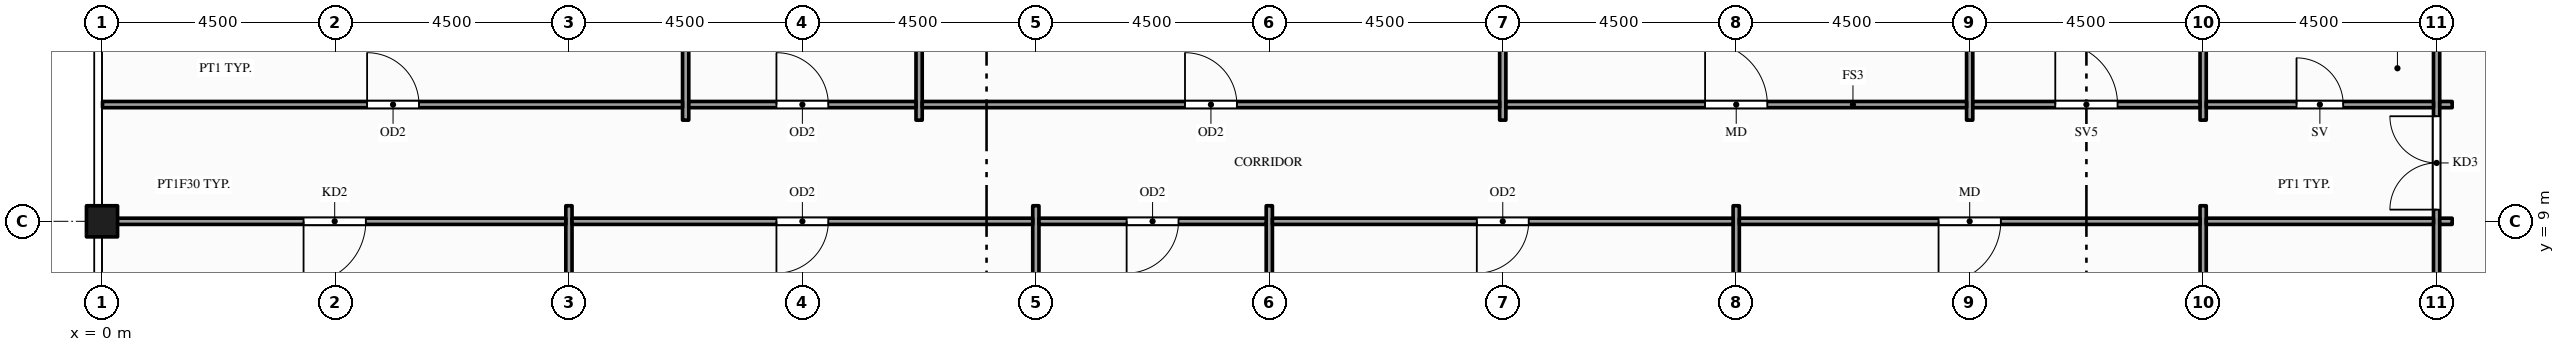
"""IFC4 building model, lengths in metres.
Left out: names, types, materials, properties, quantities, classifications, styles, units other than length and angle.
Written with IfcOpenShell. Run it as: python <this file> out.ifc"""

import sys

from ifc_helpers import new_model, si_unit, direction, frame, frame_2d, origin, origin_2d, place, context, subcontext, project, spatial, rectangle, hollow_rectangle, extrude, element, fill, save


model = new_model("IFC4")
c1 = context("Model", 3, precision=1e-05, world=origin(), true_north=direction((0.0, 1.0)))
c2 = subcontext(c1, "Body", "Model", "MODEL_VIEW")
j1 = project(units=[si_unit("LENGTHUNIT", "METRE"), si_unit("PLANEANGLEUNIT", "RADIAN")], contexts=[c1])
p1 = place(None, origin())
s1 = spatial("IfcSite", under=j1, at=p1, CompositionType="ELEMENT")
p2 = place(p1, origin())
s2 = spatial("IfcBuilding", under=s1, at=p2, CompositionType="ELEMENT")
p3 = place(p2, frame((0.0, 0.0, 314.0)))
s3 = spatial("IfcBuildingStorey", under=s2, at=p3, CompositionType="ELEMENT", Elevation=314.0)
p4 = place(p3, frame((0.0, 9.0, -0.15), z_axis=(0.0, 0.0, 1.0), x_axis=(1.0, 0.0, 0.0)))
e1 = element("IfcColumn", 1, at=p4, inside=s3, PredefinedType="COLUMN", context=c2, shape_type="SweptSolid", body=[
    extrude(hollow_rectangle(XDim=0.6, YDim=0.6, WallThickness=0.03, at=origin_2d()), origin(), (0.0, 0.0, 1.0), 4.5),
])
p5 = place(p3, frame((9.0, 3.875, 0.0), z_axis=(0.0, 0.0, 1.0), x_axis=(0.0, 1.0, 0.0)))
e2 = element("IfcWall", 2, at=p5, inside=s3, PredefinedType="PARTITIONING", context=c2, shape_type="SweptSolid", body=[
    extrude(rectangle(XDim=5.425, YDim=0.12, at=frame_2d((2.712, 0.0))), origin(), (0.0, 0.0, 1.0), 3.359),
])
for number, where, z_axis, x_axis in (
    (3, (11.25, 10.95, 0.0), (0.0, 0.0, 1.0), (0.0, 1.0, 0.0)),
    (4, (15.75, 10.95, 0.0), (0.0, 0.0, 1.0), (0.0, 1.0, 0.0)),
):
    element("IfcWall", number, at=place(p3, frame(where, z_axis=z_axis, x_axis=x_axis)), inside=s3, PredefinedType="PARTITIONING", context=c2, shape_type="SweptSolid", body=[
        extrude(rectangle(XDim=11.54, YDim=0.12, at=frame_2d((5.77, 0.0))), origin(), (0.0, 0.0, 1.0), 3.359),
    ])
for number, where, z_axis, x_axis in (
    (5, (18.0, 0.01, 0.0), (0.0, 0.0, 1.0), (0.0, 1.0, 0.0)),
    (6, (22.5, 0.01, 0.0), (0.0, 0.0, 1.0), (0.0, 1.0, 0.0)),
):
    element("IfcWall", number, at=place(p3, frame(where, z_axis=z_axis, x_axis=x_axis)), inside=s3, PredefinedType="PARTITIONING", context=c2, shape_type="SweptSolid", body=[
        extrude(rectangle(XDim=9.29, YDim=0.12, at=frame_2d((4.645, 0.0))), origin(), (0.0, 0.0, 1.0), 3.359),
    ])
p6 = place(p3, frame((27.0, 10.95, 0.0), z_axis=(0.0, 0.0, 1.0), x_axis=(0.0, 1.0, 0.0)))
e7 = element("IfcWall", 7, at=p6, inside=s3, PredefinedType="PARTITIONING", context=c2, shape_type="SweptSolid", body=[
    extrude(rectangle(XDim=11.54, YDim=0.12, at=frame_2d((5.77, 0.0))), origin(), (0.0, 0.0, 1.0), 3.359),
])
p7 = place(p3, frame((31.5, 0.01, 0.0), z_axis=(0.0, 0.0, 1.0), x_axis=(0.0, 1.0, 0.0)))
e8 = element("IfcWall", 8, at=p7, inside=s3, PredefinedType="PARTITIONING", context=c2, shape_type="SweptSolid", body=[
    extrude(rectangle(XDim=9.29, YDim=0.12, at=frame_2d((4.645, 0.0))), origin(), (0.0, 0.0, 1.0), 3.359),
])
p8 = place(p3, frame((36.0, 10.95, 0.0), z_axis=(0.0, 0.0, 1.0), x_axis=(0.0, 1.0, 0.0)))
e9 = element("IfcWall", 9, at=p8, inside=s3, PredefinedType="PARTITIONING", context=c2, shape_type="SweptSolid", body=[
    extrude(rectangle(XDim=11.54, YDim=0.12, at=frame_2d((5.77, 0.0))), origin(), (0.0, 0.0, 1.0), 3.359),
])
p9 = place(p3, frame((40.5, 0.01, 0.0), z_axis=(0.0, 0.0, 1.0), x_axis=(0.0, 1.0, 0.0)))
e10 = element("IfcWall", 10, at=p9, inside=s3, PredefinedType="PARTITIONING", context=c2, shape_type="SweptSolid", body=[
    extrude(rectangle(XDim=9.29, YDim=0.12, at=frame_2d((4.645, 0.0))), origin(), (0.0, 0.0, 1.0), 3.359),
])
p10 = place(p3, frame((40.5, 10.95, 0.0), z_axis=(0.0, 0.0, 1.0), x_axis=(0.0, 1.0, 0.0)))
e11 = element("IfcWall", 11, at=p10, inside=s3, PredefinedType="PARTITIONING", context=c2, shape_type="SweptSolid", body=[
    extrude(rectangle(XDim=11.54, YDim=0.12, at=frame_2d((5.77, 0.0))), origin(), (0.0, 0.0, 1.0), 3.359),
])
p11 = place(p3, frame((45.0, 0.01, 0.0), z_axis=(0.0, 0.0, 1.0), x_axis=(0.0, 1.0, 0.0)))
e12 = element("IfcWall", 12, at=p11, inside=s3, PredefinedType="PARTITIONING", context=c2, shape_type="SweptSolid", body=[
    extrude(rectangle(XDim=22.48, YDim=0.12, at=frame_2d((11.24, 0.0))), origin(), (0.0, 0.0, 1.0), 3.359),
])
p12 = place(p11, frame((9.215, 0.0, 0.0)))
e13 = element("IfcOpeningElement", 13, at=p12, cuts=e12, PredefinedType="OPENING", context=c2, shape_type="SweptSolid", body=[
    extrude(rectangle(XDim=1.8, YDim=2.1, at=frame_2d((0.9, 1.05))), frame((0.0, 0.07, 0.0), z_axis=(0.0, -1.0, 0.0), x_axis=(1.0, 0.0, 0.0)), (0.0, 0.0, 1.0), 0.14),
])
p13 = place(p11, frame((0.99, 0.0, 0.0)))
e14 = element("IfcOpeningElement", 14, at=p13, cuts=e12, PredefinedType="OPENING", context=c2, shape_type="SweptSolid", body=[
    extrude(rectangle(XDim=0.9, YDim=2.1, at=frame_2d((0.45, 1.05))), frame((0.0, 0.07, 0.0), z_axis=(0.0, -1.0, 0.0), x_axis=(1.0, 0.0, 0.0)), (0.0, 0.0, 1.0), 0.14),
])
p14 = place(p11, frame((4.04, 0.0, 0.0)))
e15 = element("IfcOpeningElement", 15, at=p14, cuts=e12, PredefinedType="OPENING", context=c2, shape_type="SweptSolid", body=[
    extrude(rectangle(XDim=0.9, YDim=2.1, at=frame_2d((0.45, 1.05))), frame((0.0, 0.07, 0.0), z_axis=(0.0, -1.0, 0.0), x_axis=(1.0, 0.0, 0.0)), (0.0, 0.0, 1.0), 0.14),
])
p15 = place(p11, frame((6.99, 0.0, 0.0)))
e16 = element("IfcOpeningElement", 16, at=p15, cuts=e12, PredefinedType="OPENING", context=c2, shape_type="SweptSolid", body=[
    extrude(rectangle(XDim=1.0, YDim=2.1, at=frame_2d((0.5, 1.05))), frame((0.0, 0.07, 0.0), z_axis=(0.0, -1.0, 0.0), x_axis=(1.0, 0.0, 0.0)), (0.0, 0.0, 1.0), 0.14),
])
p16 = place(p3, frame((0.01, 9.0, 0.0), z_axis=(0.0, 0.0, 1.0), x_axis=(1.0, 0.0, 0.0)))
e17 = element("IfcWall", 17, at=p16, inside=s3, PredefinedType="PARTITIONING", context=c2, shape_type="SweptSolid", body=[
    extrude(rectangle(XDim=8.93, YDim=0.12, at=frame_2d((4.465, 0.0))), origin(), (0.0, 0.0, 1.0), 3.359),
])
p17 = place(p16, frame((3.875, 0.0, 0.0)))
e18 = element("IfcOpeningElement", 18, at=p17, cuts=e17, PredefinedType="OPENING", context=c2, shape_type="SweptSolid", body=[
    extrude(rectangle(XDim=1.2, YDim=2.1, at=frame_2d((0.6, 1.05))), frame((0.0, 0.07, 0.0), z_axis=(0.0, -1.0, 0.0), x_axis=(1.0, 0.0, 0.0)), (0.0, 0.0, 1.0), 0.14),
])
p18 = place(p3, frame((9.06, 9.0, 0.0), z_axis=(0.0, 0.0, 1.0), x_axis=(1.0, 0.0, 0.0)))
e19 = element("IfcWall", 19, at=p18, inside=s3, PredefinedType="PARTITIONING", context=c2, shape_type="SweptSolid", body=[
    extrude(rectangle(XDim=8.88, YDim=0.12, at=frame_2d((4.44, 0.0))), origin(), (0.0, 0.0, 1.0), 3.359),
])
p19 = place(p18, frame((3.94, 0.0, 0.0)))
e20 = element("IfcOpeningElement", 20, at=p19, cuts=e19, PredefinedType="OPENING", context=c2, shape_type="SweptSolid", body=[
    extrude(rectangle(XDim=1.0, YDim=2.1, at=frame_2d((0.5, 1.05))), frame((0.0, 0.07, 0.0), z_axis=(0.0, -1.0, 0.0), x_axis=(1.0, 0.0, 0.0)), (0.0, 0.0, 1.0), 0.14),
])
p20 = place(p3, frame((18.06, 9.0, 0.0), z_axis=(0.0, 0.0, 1.0), x_axis=(1.0, 0.0, 0.0)))
e21 = element("IfcWall", 21, at=p20, inside=s3, PredefinedType="PARTITIONING", context=c2, shape_type="SweptSolid", body=[
    extrude(rectangle(XDim=4.38, YDim=0.12, at=frame_2d((2.19, 0.0))), origin(), (0.0, 0.0, 1.0), 3.359),
])
p21 = place(p20, frame((1.69, 0.0, 0.0)))
e22 = element("IfcOpeningElement", 22, at=p21, cuts=e21, PredefinedType="OPENING", context=c2, shape_type="SweptSolid", body=[
    extrude(rectangle(XDim=1.0, YDim=2.1, at=frame_2d((0.5, 1.05))), frame((0.0, 0.07, 0.0), z_axis=(0.0, -1.0, 0.0), x_axis=(1.0, 0.0, 0.0)), (0.0, 0.0, 1.0), 0.14),
])
p22 = place(p3, frame((22.56, 9.0, 0.0), z_axis=(0.0, 0.0, 1.0), x_axis=(1.0, 0.0, 0.0)))
e23 = element("IfcWall", 23, at=p22, inside=s3, PredefinedType="PARTITIONING", context=c2, shape_type="SweptSolid", body=[
    extrude(rectangle(XDim=8.88, YDim=0.12, at=frame_2d((4.44, 0.0))), origin(), (0.0, 0.0, 1.0), 3.359),
])
p23 = place(p22, frame((3.94, 0.0, 0.0)))
e24 = element("IfcOpeningElement", 24, at=p23, cuts=e23, PredefinedType="OPENING", context=c2, shape_type="SweptSolid", body=[
    extrude(rectangle(XDim=1.0, YDim=2.1, at=frame_2d((0.5, 1.05))), frame((0.0, 0.07, 0.0), z_axis=(0.0, -1.0, 0.0), x_axis=(1.0, 0.0, 0.0)), (0.0, 0.0, 1.0), 0.14),
])
p24 = place(p3, frame((31.56, 9.0, 0.0), z_axis=(0.0, 0.0, 1.0), x_axis=(1.0, 0.0, 0.0)))
e25 = element("IfcWall", 25, at=p24, inside=s3, PredefinedType="PARTITIONING", context=c2, shape_type="SweptSolid", body=[
    extrude(rectangle(XDim=8.88, YDim=0.12, at=frame_2d((4.44, 0.0))), origin(), (0.0, 0.0, 1.0), 3.359),
])
p25 = place(p24, frame((3.84, 0.0, 0.0)))
e26 = element("IfcOpeningElement", 26, at=p25, cuts=e25, PredefinedType="OPENING", context=c2, shape_type="SweptSolid", body=[
    extrude(rectangle(XDim=1.2, YDim=2.1, at=frame_2d((0.6, 1.05))), frame((0.0, 0.07, 0.0), z_axis=(0.0, -1.0, 0.0), x_axis=(1.0, 0.0, 0.0)), (0.0, 0.0, 1.0), 0.14),
])
p26 = place(p3, frame((40.56, 9.0, 0.0), z_axis=(0.0, 0.0, 1.0), x_axis=(1.0, 0.0, 0.0)))
e27 = element("IfcWall", 27, at=p26, inside=s3, PredefinedType="PARTITIONING", context=c2, shape_type="SweptSolid", body=[
    extrude(rectangle(XDim=4.38, YDim=0.12, at=frame_2d((2.19, 0.0))), origin(), (0.0, 0.0, 1.0), 3.359),
])
p27 = place(p3, frame((45.06, 9.0, 0.0), z_axis=(0.0, 0.0, 1.0), x_axis=(1.0, 0.0, 0.0)))
e28 = element("IfcWall", 28, at=p27, inside=s3, PredefinedType="PARTITIONING", context=c2, shape_type="SweptSolid", body=[
    extrude(rectangle(XDim=0.24, YDim=0.12, at=frame_2d((0.12, 0.0))), origin(), (0.0, 0.0, 1.0), 3.359),
])
p28 = place(p3, frame((0.01, 11.25, 0.0), z_axis=(0.0, 0.0, 1.0), x_axis=(1.0, 0.0, 0.0)))
e29 = element("IfcWall", 29, at=p28, inside=s3, PredefinedType="PARTITIONING", context=c2, shape_type="SweptSolid", body=[
    extrude(rectangle(XDim=11.18, YDim=0.12, at=frame_2d((5.59, 0.0))), origin(), (0.0, 0.0, 1.0), 3.359),
])
p29 = place(p28, frame((5.1, 0.0, 0.0)))
e30 = element("IfcOpeningElement", 30, at=p29, cuts=e29, PredefinedType="OPENING", context=c2, shape_type="SweptSolid", body=[
    extrude(rectangle(XDim=1.0, YDim=2.1, at=frame_2d((0.5, 1.05))), frame((0.0, 0.07, 0.0), z_axis=(0.0, -1.0, 0.0), x_axis=(1.0, 0.0, 0.0)), (0.0, 0.0, 1.0), 0.14),
])
p30 = place(p3, frame((11.31, 11.25, 0.0), z_axis=(0.0, 0.0, 1.0), x_axis=(1.0, 0.0, 0.0)))
e31 = element("IfcWall", 31, at=p30, inside=s3, PredefinedType="PARTITIONING", context=c2, shape_type="SweptSolid", body=[
    extrude(rectangle(XDim=4.38, YDim=0.12, at=frame_2d((2.19, 0.0))), origin(), (0.0, 0.0, 1.0), 3.359),
])
p31 = place(p30, frame((1.69, 0.0, 0.0)))
e32 = element("IfcOpeningElement", 32, at=p31, cuts=e31, PredefinedType="OPENING", context=c2, shape_type="SweptSolid", body=[
    extrude(rectangle(XDim=1.0, YDim=2.1, at=frame_2d((0.5, 1.05))), frame((0.0, 0.07, 0.0), z_axis=(0.0, -1.0, 0.0), x_axis=(1.0, 0.0, 0.0)), (0.0, 0.0, 1.0), 0.14),
])
p32 = place(p3, frame((15.81, 11.25, 0.0), z_axis=(0.0, 0.0, 1.0), x_axis=(1.0, 0.0, 0.0)))
e33 = element("IfcWall", 33, at=p32, inside=s3, PredefinedType="PARTITIONING", context=c2, shape_type="SweptSolid", body=[
    extrude(rectangle(XDim=11.13, YDim=0.12, at=frame_2d((5.565, 0.0))), origin(), (0.0, 0.0, 1.0), 3.359),
])
p33 = place(p32, frame((5.065, 0.0, 0.0)))
e34 = element("IfcOpeningElement", 34, at=p33, cuts=e33, PredefinedType="OPENING", context=c2, shape_type="SweptSolid", body=[
    extrude(rectangle(XDim=1.0, YDim=2.1, at=frame_2d((0.5, 1.05))), frame((0.0, 0.07, 0.0), z_axis=(0.0, -1.0, 0.0), x_axis=(1.0, 0.0, 0.0)), (0.0, 0.0, 1.0), 0.14),
])
p34 = place(p3, frame((27.06, 11.25, 0.0), z_axis=(0.0, 0.0, 1.0), x_axis=(1.0, 0.0, 0.0)))
e35 = element("IfcWall", 35, at=p34, inside=s3, PredefinedType="PARTITIONING", context=c2, shape_type="SweptSolid", body=[
    extrude(rectangle(XDim=8.88, YDim=0.12, at=frame_2d((4.44, 0.0))), origin(), (0.0, 0.0, 1.0), 3.359),
])
p35 = place(p34, frame((3.84, 0.0, 0.0)))
e36 = element("IfcOpeningElement", 36, at=p35, cuts=e35, PredefinedType="OPENING", context=c2, shape_type="SweptSolid", body=[
    extrude(rectangle(XDim=1.2, YDim=2.1, at=frame_2d((0.6, 1.05))), frame((0.0, 0.07, 0.0), z_axis=(0.0, -1.0, 0.0), x_axis=(1.0, 0.0, 0.0)), (0.0, 0.0, 1.0), 0.14),
])
p36 = place(p3, frame((36.06, 11.25, 0.0), z_axis=(0.0, 0.0, 1.0), x_axis=(1.0, 0.0, 0.0)))
e37 = element("IfcWall", 37, at=p36, inside=s3, PredefinedType="PARTITIONING", context=c2, shape_type="SweptSolid", body=[
    extrude(rectangle(XDim=4.38, YDim=0.12, at=frame_2d((2.19, 0.0))), origin(), (0.0, 0.0, 1.0), 3.359),
])
p37 = place(p36, frame((1.59, 0.0, 0.0)))
e38 = element("IfcOpeningElement", 38, at=p37, cuts=e37, PredefinedType="OPENING", context=c2, shape_type="SweptSolid", body=[
    extrude(rectangle(XDim=1.2, YDim=2.1, at=frame_2d((0.6, 1.05))), frame((0.0, 0.07, 0.0), z_axis=(0.0, -1.0, 0.0), x_axis=(1.0, 0.0, 0.0)), (0.0, 0.0, 1.0), 0.14),
])
p38 = place(p3, frame((40.56, 11.25, 0.0), z_axis=(0.0, 0.0, 1.0), x_axis=(1.0, 0.0, 0.0)))
e39 = element("IfcWall", 39, at=p38, inside=s3, PredefinedType="PARTITIONING", context=c2, shape_type="SweptSolid", body=[
    extrude(rectangle(XDim=4.38, YDim=0.12, at=frame_2d((2.19, 0.0))), origin(), (0.0, 0.0, 1.0), 3.359),
])
p39 = place(p38, frame((1.74, 0.0, 0.0)))
e40 = element("IfcOpeningElement", 40, at=p39, cuts=e39, PredefinedType="OPENING", context=c2, shape_type="SweptSolid", body=[
    extrude(rectangle(XDim=0.9, YDim=2.1, at=frame_2d((0.45, 1.05))), frame((0.0, 0.07, 0.0), z_axis=(0.0, -1.0, 0.0), x_axis=(1.0, 0.0, 0.0)), (0.0, 0.0, 1.0), 0.14),
])
p40 = place(p3, frame((45.06, 11.25, 0.0), z_axis=(0.0, 0.0, 1.0), x_axis=(1.0, 0.0, 0.0)))
e41 = element("IfcWall", 41, at=p40, inside=s3, PredefinedType="PARTITIONING", context=c2, shape_type="SweptSolid", body=[
    extrude(rectangle(XDim=0.24, YDim=0.12, at=frame_2d((0.12, 0.0))), origin(), (0.0, 0.0, 1.0), 3.359),
])
p41 = place(p12, origin())
e42 = element("IfcDoor", 42, at=p41, inside=s3, OperationType="DOUBLE_DOOR_SINGLE_SWING", PredefinedType="DOOR", context=c2, shape_type="SweptSolid", body=[
    extrude(rectangle(XDim=1.8, YDim=2.1, at=frame_2d((0.9, 1.05))), frame((0.0, 0.025, 0.0), z_axis=(0.0, -1.0, 0.0), x_axis=(1.0, 0.0, 0.0)), (0.0, 0.0, 1.0), 0.05),
])
fill(e13, e42)
p42 = place(p17, origin())
e43 = element("IfcDoor", 43, at=p42, inside=s3, OperationType="SINGLE_SWING_LEFT", PredefinedType="DOOR", context=c2, shape_type="SweptSolid", body=[
    extrude(rectangle(XDim=1.2, YDim=2.1, at=frame_2d((0.6, 1.05))), frame((0.0, 0.025, 0.0), z_axis=(0.0, -1.0, 0.0), x_axis=(1.0, 0.0, 0.0)), (0.0, 0.0, 1.0), 0.05),
])
fill(e18, e43)
p43 = place(p19, origin())
e44 = element("IfcDoor", 44, at=p43, inside=s3, OperationType="SINGLE_SWING_LEFT", PredefinedType="DOOR", context=c2, shape_type="SweptSolid", body=[
    extrude(rectangle(XDim=1.0, YDim=2.1, at=frame_2d((0.5, 1.05))), frame((0.0, 0.025, 0.0), z_axis=(0.0, -1.0, 0.0), x_axis=(1.0, 0.0, 0.0)), (0.0, 0.0, 1.0), 0.05),
])
fill(e20, e44)
p44 = place(p21, origin())
e45 = element("IfcDoor", 45, at=p44, inside=s3, OperationType="SINGLE_SWING_LEFT", PredefinedType="DOOR", context=c2, shape_type="SweptSolid", body=[
    extrude(rectangle(XDim=1.0, YDim=2.1, at=frame_2d((0.5, 1.05))), frame((0.0, 0.025, 0.0), z_axis=(0.0, -1.0, 0.0), x_axis=(1.0, 0.0, 0.0)), (0.0, 0.0, 1.0), 0.05),
])
fill(e22, e45)
p45 = place(p23, origin())
e46 = element("IfcDoor", 46, at=p45, inside=s3, OperationType="SINGLE_SWING_LEFT", PredefinedType="DOOR", context=c2, shape_type="SweptSolid", body=[
    extrude(rectangle(XDim=1.0, YDim=2.1, at=frame_2d((0.5, 1.05))), frame((0.0, 0.025, 0.0), z_axis=(0.0, -1.0, 0.0), x_axis=(1.0, 0.0, 0.0)), (0.0, 0.0, 1.0), 0.05),
])
fill(e24, e46)
p46 = place(p25, origin())
e47 = element("IfcDoor", 47, at=p46, inside=s3, OperationType="SINGLE_SWING_LEFT", PredefinedType="DOOR", context=c2, shape_type="SweptSolid", body=[
    extrude(rectangle(XDim=1.2, YDim=2.1, at=frame_2d((0.6, 1.05))), frame((0.0, 0.025, 0.0), z_axis=(0.0, -1.0, 0.0), x_axis=(1.0, 0.0, 0.0)), (0.0, 0.0, 1.0), 0.05),
])
fill(e26, e47)
p47 = place(p29, origin())
e48 = element("IfcDoor", 48, at=p47, inside=s3, OperationType="SINGLE_SWING_LEFT", PredefinedType="DOOR", context=c2, shape_type="SweptSolid", body=[
    extrude(rectangle(XDim=1.0, YDim=2.1, at=frame_2d((0.5, 1.05))), frame((0.0, 0.025, 0.0), z_axis=(0.0, -1.0, 0.0), x_axis=(1.0, 0.0, 0.0)), (0.0, 0.0, 1.0), 0.05),
])
fill(e30, e48)
p48 = place(p31, origin())
e49 = element("IfcDoor", 49, at=p48, inside=s3, OperationType="SINGLE_SWING_LEFT", PredefinedType="DOOR", context=c2, shape_type="SweptSolid", body=[
    extrude(rectangle(XDim=1.0, YDim=2.1, at=frame_2d((0.5, 1.05))), frame((0.0, 0.025, 0.0), z_axis=(0.0, -1.0, 0.0), x_axis=(1.0, 0.0, 0.0)), (0.0, 0.0, 1.0), 0.05),
])
fill(e32, e49)
p49 = place(p33, origin())
e50 = element("IfcDoor", 50, at=p49, inside=s3, OperationType="SINGLE_SWING_LEFT", PredefinedType="DOOR", context=c2, shape_type="SweptSolid", body=[
    extrude(rectangle(XDim=1.0, YDim=2.1, at=frame_2d((0.5, 1.05))), frame((0.0, 0.025, 0.0), z_axis=(0.0, -1.0, 0.0), x_axis=(1.0, 0.0, 0.0)), (0.0, 0.0, 1.0), 0.05),
])
fill(e34, e50)
p50 = place(p35, origin())
e51 = element("IfcDoor", 51, at=p50, inside=s3, OperationType="SINGLE_SWING_LEFT", PredefinedType="DOOR", context=c2, shape_type="SweptSolid", body=[
    extrude(rectangle(XDim=1.2, YDim=2.1, at=frame_2d((0.6, 1.05))), frame((0.0, 0.025, 0.0), z_axis=(0.0, -1.0, 0.0), x_axis=(1.0, 0.0, 0.0)), (0.0, 0.0, 1.0), 0.05),
])
fill(e36, e51)
p51 = place(p37, origin())
e52 = element("IfcDoor", 52, at=p51, inside=s3, OperationType="SINGLE_SWING_LEFT", PredefinedType="DOOR", context=c2, shape_type="SweptSolid", body=[
    extrude(rectangle(XDim=1.2, YDim=2.1, at=frame_2d((0.6, 1.05))), frame((0.0, 0.025, 0.0), z_axis=(0.0, -1.0, 0.0), x_axis=(1.0, 0.0, 0.0)), (0.0, 0.0, 1.0), 0.05),
])
fill(e38, e52)
p52 = place(p39, origin())
e53 = element("IfcDoor", 53, at=p52, inside=s3, OperationType="SINGLE_SWING_LEFT", PredefinedType="DOOR", context=c2, shape_type="SweptSolid", body=[
    extrude(rectangle(XDim=0.9, YDim=2.1, at=frame_2d((0.45, 1.05))), frame((0.0, 0.025, 0.0), z_axis=(0.0, -1.0, 0.0), x_axis=(1.0, 0.0, 0.0)), (0.0, 0.0, 1.0), 0.05),
])
fill(e40, e53)
save(model, sys.argv[1])
